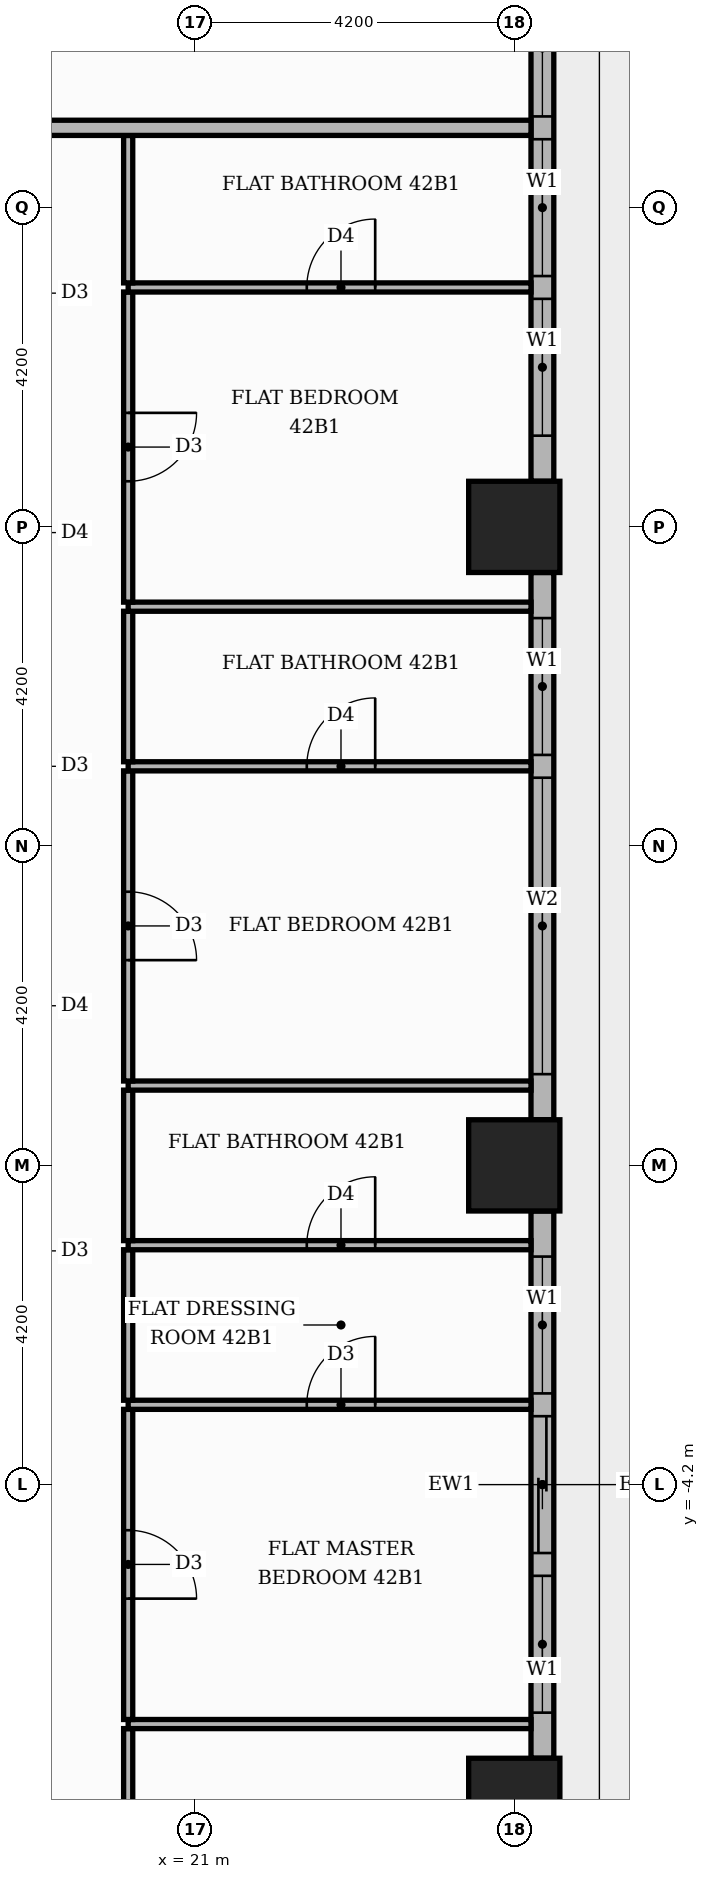
"""IFC4 building model, lengths in metres.
Left out: names, types, materials, properties, quantities, classifications, styles, units other than length and angle.
Written with IfcOpenShell. Run it as: python <this file> out.ifc"""

import sys

from ifc_helpers import new_model, si_unit, direction, frame, frame_2d, origin, origin_2d, place, context, subcontext, project, spatial, rectangle, extrude, element, fill, save


model = new_model("IFC4")
c1 = context("Model", 3, precision=1e-05, world=origin(), true_north=direction((0.0, 1.0)))
c2 = subcontext(c1, "Body", "Model", "MODEL_VIEW")
j1 = project(units=[si_unit("LENGTHUNIT", "METRE"), si_unit("PLANEANGLEUNIT", "RADIAN")], contexts=[c1])
p1 = place(None, origin())
s1 = spatial("IfcSite", under=j1, at=p1, CompositionType="ELEMENT")
p2 = place(p1, origin())
s2 = spatial("IfcBuilding", under=s1, at=p2, CompositionType="ELEMENT")
p3 = place(p2, frame((0.0, 0.0, 176.7)))
s3 = spatial("IfcBuildingStorey", under=s2, at=p3, CompositionType="ELEMENT", Elevation=176.7)
for number, where, z_axis, x_axis in (
    (1, (25.2, 0.0, 0.0), (0.0, 0.0, 1.0), (1.0, 0.0, 0.0)),
    (2, (25.2, 8.4, 0.0), (0.0, 0.0, 1.0), (1.0, 0.0, 0.0)),
    (3, (25.2, -8.4, 0.0), (0.0, 0.0, 1.0), (1.0, 0.0, 0.0)),
):
    element("IfcColumn", number, at=place(p3, frame(where, z_axis=z_axis, x_axis=x_axis)), inside=s3, PredefinedType="COLUMN", context=c2, shape_type="SweptSolid", body=[
        extrude(rectangle(XDim=1.2, YDim=1.2, at=origin_2d()), origin(), (0.0, 0.0, 1.0), 3.9),
    ])
p4 = place(p3, frame((25.57, -7.8, 0.0), z_axis=(0.0, 0.0, 1.0), x_axis=(0.0, 1.0, 0.0)))
e4 = element("IfcWall", 4, at=p4, inside=s3, PredefinedType="STANDARD", context=c2, shape_type="SweptSolid", body=[
    extrude(rectangle(XDim=7.2, YDim=0.3, at=frame_2d((3.6, 0.0))), origin(), (0.0, 0.0, 1.0), 3.4),
])
p5 = place(p4, frame((0.6, 0.0, 0.9)))
e5 = element("IfcOpeningElement", 5, at=p5, cuts=e4, PredefinedType="OPENING", context=c2, shape_type="SweptSolid", body=[
    extrude(rectangle(XDim=1.8, YDim=2.1, at=frame_2d((0.9, 1.05))), frame((0.0, 0.16, 0.0), z_axis=(0.0, -1.0, 0.0), x_axis=(1.0, 0.0, 0.0)), (0.0, 0.0, 1.0), 0.32),
])
p6 = place(p4, frame((2.7, 0.0, 0.0)))
e6 = element("IfcOpeningElement", 6, at=p6, cuts=e4, PredefinedType="OPENING", context=c2, shape_type="SweptSolid", body=[
    extrude(rectangle(XDim=1.8, YDim=2.4, at=frame_2d((0.9, 1.2))), frame((0.0, 0.16, 0.0), z_axis=(0.0, -1.0, 0.0), x_axis=(1.0, 0.0, 0.0)), (0.0, 0.0, 1.0), 0.32),
])
p7 = place(p4, frame((4.8, 0.0, 0.9)))
e7 = element("IfcOpeningElement", 7, at=p7, cuts=e4, PredefinedType="OPENING", context=c2, shape_type="SweptSolid", body=[
    extrude(rectangle(XDim=1.8, YDim=2.1, at=frame_2d((0.9, 1.05))), frame((0.0, 0.16, 0.0), z_axis=(0.0, -1.0, 0.0), x_axis=(1.0, 0.0, 0.0)), (0.0, 0.0, 1.0), 0.32),
])
p8 = place(p3, frame((25.57, 0.6, 0.0), z_axis=(0.0, 0.0, 1.0), x_axis=(0.0, 1.0, 0.0)))
e8 = element("IfcWall", 8, at=p8, inside=s3, PredefinedType="STANDARD", context=c2, shape_type="SweptSolid", body=[
    extrude(rectangle(XDim=7.2, YDim=0.3, at=frame_2d((3.6, 0.0))), origin(), (0.0, 0.0, 1.0), 3.4),
])
p9 = place(p8, frame((0.6, 0.0, 0.9)))
e9 = element("IfcOpeningElement", 9, at=p9, cuts=e8, PredefinedType="OPENING", context=c2, shape_type="SweptSolid", body=[
    extrude(rectangle(XDim=3.9, YDim=2.1, at=frame_2d((1.95, 1.05))), frame((0.0, 0.16, 0.0), z_axis=(0.0, -1.0, 0.0), x_axis=(1.0, 0.0, 0.0)), (0.0, 0.0, 1.0), 0.32),
])
p10 = place(p8, frame((4.8, 0.0, 0.9)))
e10 = element("IfcOpeningElement", 10, at=p10, cuts=e8, PredefinedType="OPENING", context=c2, shape_type="SweptSolid", body=[
    extrude(rectangle(XDim=1.8, YDim=2.1, at=frame_2d((0.9, 1.05))), frame((0.0, 0.16, 0.0), z_axis=(0.0, -1.0, 0.0), x_axis=(1.0, 0.0, 0.0)), (0.0, 0.0, 1.0), 0.32),
])
p11 = place(p3, frame((25.57, 9.0, 0.0), z_axis=(0.0, 0.0, 1.0), x_axis=(0.0, 1.0, 0.0)))
e11 = element("IfcWall", 11, at=p11, inside=s3, PredefinedType="STANDARD", context=c2, shape_type="SweptSolid", body=[
    extrude(rectangle(XDim=7.2, YDim=0.3, at=frame_2d((3.6, 0.0))), origin(), (0.0, 0.0, 1.0), 3.4),
])
p12 = place(p11, frame((0.6, 0.0, 0.9)))
e12 = element("IfcOpeningElement", 12, at=p12, cuts=e11, PredefinedType="OPENING", context=c2, shape_type="SweptSolid", body=[
    extrude(rectangle(XDim=1.8, YDim=2.1, at=frame_2d((0.9, 1.05))), frame((0.0, 0.16, 0.0), z_axis=(0.0, -1.0, 0.0), x_axis=(1.0, 0.0, 0.0)), (0.0, 0.0, 1.0), 0.32),
])
p13 = place(p11, frame((2.7, 0.0, 0.9)))
e13 = element("IfcOpeningElement", 13, at=p13, cuts=e11, PredefinedType="OPENING", context=c2, shape_type="SweptSolid", body=[
    extrude(rectangle(XDim=1.8, YDim=2.1, at=frame_2d((0.9, 1.05))), frame((0.0, 0.16, 0.0), z_axis=(0.0, -1.0, 0.0), x_axis=(1.0, 0.0, 0.0)), (0.0, 0.0, 1.0), 0.32),
])
p14 = place(p11, frame((4.8, 0.0, 0.9)))
e14 = element("IfcOpeningElement", 14, at=p14, cuts=e11, PredefinedType="OPENING", context=c2, shape_type="SweptSolid", body=[
    extrude(rectangle(XDim=1.8, YDim=2.1, at=frame_2d((0.9, 1.05))), frame((0.0, 0.16, 0.0), z_axis=(0.0, -1.0, 0.0), x_axis=(1.0, 0.0, 0.0)), (0.0, 0.0, 1.0), 0.32),
])
p15 = place(p3, frame((20.12, -11.49, 0.0), z_axis=(0.0, 0.0, 1.0), x_axis=(0.0, 1.0, 0.0)))
e15 = element("IfcWall", 15, at=p15, inside=s3, PredefinedType="PARTITIONING", context=c2, shape_type="SweptSolid", body=[
    extrude(rectangle(XDim=4.08, YDim=0.12, at=frame_2d((2.04, 0.0))), origin(), (0.0, 0.0, 1.0), 3.4),
])
p16 = place(p15, frame((1.59, 0.0, 0.0)))
e16 = element("IfcOpeningElement", 16, at=p16, cuts=e15, PredefinedType="OPENING", context=c2, shape_type="SweptSolid", body=[
    extrude(rectangle(XDim=0.9, YDim=2.1, at=frame_2d((0.45, 1.05))), frame((0.0, 0.07, 0.0), z_axis=(0.0, -1.0, 0.0), x_axis=(1.0, 0.0, 0.0)), (0.0, 0.0, 1.0), 0.14),
])
p17 = place(p3, frame((20.12, -7.35, 0.0), z_axis=(0.0, 0.0, 1.0), x_axis=(1.0, 0.0, 0.0)))
e17 = element("IfcWall", 17, at=p17, inside=s3, PredefinedType="PARTITIONING", context=c2, shape_type="SweptSolid", body=[
    extrude(rectangle(XDim=5.3, YDim=0.12, at=frame_2d((2.65, 0.0))), origin(), (0.0, 0.0, 1.0), 3.4),
])
p18 = place(p3, frame((20.12, -7.29, 0.0), z_axis=(0.0, 0.0, 1.0), x_axis=(0.0, 1.0, 0.0)))
e18 = element("IfcWall", 18, at=p18, inside=s3, PredefinedType="PARTITIONING", context=c2, shape_type="SweptSolid", body=[
    extrude(rectangle(XDim=4.08, YDim=0.12, at=frame_2d((2.04, 0.0))), origin(), (0.0, 0.0, 1.0), 3.4),
])
p19 = place(p18, frame((1.59, 0.0, 0.0)))
e19 = element("IfcOpeningElement", 19, at=p19, cuts=e18, PredefinedType="OPENING", context=c2, shape_type="SweptSolid", body=[
    extrude(rectangle(XDim=0.9, YDim=2.1, at=frame_2d((0.45, 1.05))), frame((0.0, 0.07, 0.0), z_axis=(0.0, -1.0, 0.0), x_axis=(1.0, 0.0, 0.0)), (0.0, 0.0, 1.0), 0.14),
])
p20 = place(p3, frame((20.12, -3.15, 0.0), z_axis=(0.0, 0.0, 1.0), x_axis=(1.0, 0.0, 0.0)))
e20 = element("IfcWall", 20, at=p20, inside=s3, PredefinedType="PARTITIONING", context=c2, shape_type="SweptSolid", body=[
    extrude(rectangle(XDim=5.3, YDim=0.12, at=frame_2d((2.65, 0.0))), origin(), (0.0, 0.0, 1.0), 3.4),
])
p21 = place(p20, frame((2.35, 0.0, 0.0)))
e21 = element("IfcOpeningElement", 21, at=p21, cuts=e20, PredefinedType="OPENING", context=c2, shape_type="SweptSolid", body=[
    extrude(rectangle(XDim=0.9, YDim=2.1, at=frame_2d((0.45, 1.05))), frame((0.0, 0.07, 0.0), z_axis=(0.0, -1.0, 0.0), x_axis=(1.0, 0.0, 0.0)), (0.0, 0.0, 1.0), 0.14),
])
p22 = place(p3, frame((20.12, -3.09, 0.0), z_axis=(0.0, 0.0, 1.0), x_axis=(0.0, 1.0, 0.0)))
e22 = element("IfcWall", 22, at=p22, inside=s3, PredefinedType="PARTITIONING", context=c2, shape_type="SweptSolid", body=[
    extrude(rectangle(XDim=1.98, YDim=0.12, at=frame_2d((0.99, 0.0))), origin(), (0.0, 0.0, 1.0), 3.4),
])
p23 = place(p3, frame((20.12, -1.05, 0.0), z_axis=(0.0, 0.0, 1.0), x_axis=(1.0, 0.0, 0.0)))
e23 = element("IfcWall", 23, at=p23, inside=s3, PredefinedType="PARTITIONING", context=c2, shape_type="SweptSolid", body=[
    extrude(rectangle(XDim=5.3, YDim=0.12, at=frame_2d((2.65, 0.0))), origin(), (0.0, 0.0, 1.0), 3.4),
])
p24 = place(p23, frame((2.35, 0.0, 0.0)))
e24 = element("IfcOpeningElement", 24, at=p24, cuts=e23, PredefinedType="OPENING", context=c2, shape_type="SweptSolid", body=[
    extrude(rectangle(XDim=0.9, YDim=2.1, at=frame_2d((0.45, 1.05))), frame((0.0, 0.07, 0.0), z_axis=(0.0, -1.0, 0.0), x_axis=(1.0, 0.0, 0.0)), (0.0, 0.0, 1.0), 0.14),
])
p25 = place(p3, frame((20.12, -0.99, 0.0), z_axis=(0.0, 0.0, 1.0), x_axis=(0.0, 1.0, 0.0)))
e25 = element("IfcWall", 25, at=p25, inside=s3, PredefinedType="PARTITIONING", context=c2, shape_type="SweptSolid", body=[
    extrude(rectangle(XDim=1.98, YDim=0.12, at=frame_2d((0.99, 0.0))), origin(), (0.0, 0.0, 1.0), 3.4),
])
p26 = place(p3, frame((20.12, 1.05, 0.0), z_axis=(0.0, 0.0, 1.0), x_axis=(1.0, 0.0, 0.0)))
e26 = element("IfcWall", 26, at=p26, inside=s3, PredefinedType="PARTITIONING", context=c2, shape_type="SweptSolid", body=[
    extrude(rectangle(XDim=5.3, YDim=0.12, at=frame_2d((2.65, 0.0))), origin(), (0.0, 0.0, 1.0), 3.4),
])
p27 = place(p3, frame((20.12, 1.11, 0.0), z_axis=(0.0, 0.0, 1.0), x_axis=(0.0, 1.0, 0.0)))
e27 = element("IfcWall", 27, at=p27, inside=s3, PredefinedType="PARTITIONING", context=c2, shape_type="SweptSolid", body=[
    extrude(rectangle(XDim=4.08, YDim=0.12, at=frame_2d((2.04, 0.0))), origin(), (0.0, 0.0, 1.0), 3.4),
])
p28 = place(p27, frame((1.59, 0.0, 0.0)))
e28 = element("IfcOpeningElement", 28, at=p28, cuts=e27, PredefinedType="OPENING", context=c2, shape_type="SweptSolid", body=[
    extrude(rectangle(XDim=0.9, YDim=2.1, at=frame_2d((0.45, 1.05))), frame((0.0, 0.07, 0.0), z_axis=(0.0, -1.0, 0.0), x_axis=(1.0, 0.0, 0.0)), (0.0, 0.0, 1.0), 0.14),
])
p29 = place(p3, frame((20.12, 5.25, 0.0), z_axis=(0.0, 0.0, 1.0), x_axis=(1.0, 0.0, 0.0)))
e29 = element("IfcWall", 29, at=p29, inside=s3, PredefinedType="PARTITIONING", context=c2, shape_type="SweptSolid", body=[
    extrude(rectangle(XDim=5.3, YDim=0.12, at=frame_2d((2.65, 0.0))), origin(), (0.0, 0.0, 1.0), 3.4),
])
p30 = place(p29, frame((2.35, 0.0, 0.0)))
e30 = element("IfcOpeningElement", 30, at=p30, cuts=e29, PredefinedType="OPENING", context=c2, shape_type="SweptSolid", body=[
    extrude(rectangle(XDim=0.9, YDim=2.1, at=frame_2d((0.45, 1.05))), frame((0.0, 0.07, 0.0), z_axis=(0.0, -1.0, 0.0), x_axis=(1.0, 0.0, 0.0)), (0.0, 0.0, 1.0), 0.14),
])
p31 = place(p3, frame((20.12, 5.31, 0.0), z_axis=(0.0, 0.0, 1.0), x_axis=(0.0, 1.0, 0.0)))
e31 = element("IfcWall", 31, at=p31, inside=s3, PredefinedType="PARTITIONING", context=c2, shape_type="SweptSolid", body=[
    extrude(rectangle(XDim=1.98, YDim=0.12, at=frame_2d((0.99, 0.0))), origin(), (0.0, 0.0, 1.0), 3.4),
])
p32 = place(p3, frame((20.12, 7.35, 0.0), z_axis=(0.0, 0.0, 1.0), x_axis=(1.0, 0.0, 0.0)))
e32 = element("IfcWall", 32, at=p32, inside=s3, PredefinedType="PARTITIONING", context=c2, shape_type="SweptSolid", body=[
    extrude(rectangle(XDim=5.3, YDim=0.12, at=frame_2d((2.65, 0.0))), origin(), (0.0, 0.0, 1.0), 3.4),
])
p33 = place(p3, frame((20.12, 7.41, 0.0), z_axis=(0.0, 0.0, 1.0), x_axis=(0.0, 1.0, 0.0)))
e33 = element("IfcWall", 33, at=p33, inside=s3, PredefinedType="PARTITIONING", context=c2, shape_type="SweptSolid", body=[
    extrude(rectangle(XDim=4.08, YDim=0.12, at=frame_2d((2.04, 0.0))), origin(), (0.0, 0.0, 1.0), 3.4),
])
p34 = place(p33, frame((1.59, 0.0, 0.0)))
e34 = element("IfcOpeningElement", 34, at=p34, cuts=e33, PredefinedType="OPENING", context=c2, shape_type="SweptSolid", body=[
    extrude(rectangle(XDim=0.9, YDim=2.1, at=frame_2d((0.45, 1.05))), frame((0.0, 0.07, 0.0), z_axis=(0.0, -1.0, 0.0), x_axis=(1.0, 0.0, 0.0)), (0.0, 0.0, 1.0), 0.14),
])
p35 = place(p3, frame((20.12, 11.55, 0.0), z_axis=(0.0, 0.0, 1.0), x_axis=(1.0, 0.0, 0.0)))
e35 = element("IfcWall", 35, at=p35, inside=s3, PredefinedType="PARTITIONING", context=c2, shape_type="SweptSolid", body=[
    extrude(rectangle(XDim=5.3, YDim=0.12, at=frame_2d((2.65, 0.0))), origin(), (0.0, 0.0, 1.0), 3.4),
])
p36 = place(p35, frame((2.35, 0.0, 0.0)))
e36 = element("IfcOpeningElement", 36, at=p36, cuts=e35, PredefinedType="OPENING", context=c2, shape_type="SweptSolid", body=[
    extrude(rectangle(XDim=0.9, YDim=2.1, at=frame_2d((0.45, 1.05))), frame((0.0, 0.07, 0.0), z_axis=(0.0, -1.0, 0.0), x_axis=(1.0, 0.0, 0.0)), (0.0, 0.0, 1.0), 0.14),
])
p37 = place(p3, frame((20.12, 11.61, 0.0), z_axis=(0.0, 0.0, 1.0), x_axis=(0.0, 1.0, 0.0)))
e37 = element("IfcWall", 37, at=p37, inside=s3, PredefinedType="PARTITIONING", context=c2, shape_type="SweptSolid", body=[
    extrude(rectangle(XDim=1.94, YDim=0.12, at=frame_2d((0.97, 0.0))), origin(), (0.0, 0.0, 1.0), 3.4),
])
p38 = place(p3, frame((-13.65, 13.65, 0.0), z_axis=(0.0, 0.0, 1.0), x_axis=(1.0, 0.0, 0.0)))
e38 = element("IfcWall", 38, at=p38, inside=s3, PredefinedType="PARTITIONING", context=c2, shape_type="SweptSolid", body=[
    extrude(rectangle(XDim=39.07, YDim=0.2, at=frame_2d((19.535, 0.0))), origin(), (0.0, 0.0, 1.0), 3.4),
])
p39 = place(p38, frame((23.6, 0.0, 0.0)))
e39 = element("IfcOpeningElement", 39, at=p39, cuts=e38, PredefinedType="OPENING", context=c2, shape_type="SweptSolid", body=[
    extrude(rectangle(XDim=1.1, YDim=2.4, at=frame_2d((0.55, 1.2))), frame((0.0, 0.11, 0.0), z_axis=(0.0, -1.0, 0.0), x_axis=(1.0, 0.0, 0.0)), (0.0, 0.0, 1.0), 0.22),
])
p40 = place(p5, origin())
e40 = element("IfcWindow", 40, at=p40, inside=s3, PartitioningType="SINGLE_PANEL", PredefinedType="WINDOW", context=c2, shape_type="SweptSolid", body=[
    extrude(rectangle(XDim=1.8, YDim=2.1, at=frame_2d((0.9, 1.05))), frame((0.0, 0.03, 0.0), z_axis=(0.0, -1.0, 0.0), x_axis=(1.0, 0.0, 0.0)), (0.0, 0.0, 1.0), 0.06),
])
fill(e5, e40)
p41 = place(p6, origin())
e41 = element("IfcDoor", 41, at=p41, inside=s3, OperationType="SLIDING_TO_LEFT", PredefinedType="DOOR", context=c2, shape_type="SweptSolid", body=[
    extrude(rectangle(XDim=1.8, YDim=2.4, at=frame_2d((0.9, 1.2))), frame((0.0, 0.025, 0.0), z_axis=(0.0, -1.0, 0.0), x_axis=(1.0, 0.0, 0.0)), (0.0, 0.0, 1.0), 0.05),
])
fill(e6, e41)
p42 = place(p7, origin())
e42 = element("IfcWindow", 42, at=p42, inside=s3, PartitioningType="SINGLE_PANEL", PredefinedType="WINDOW", context=c2, shape_type="SweptSolid", body=[
    extrude(rectangle(XDim=1.8, YDim=2.1, at=frame_2d((0.9, 1.05))), frame((0.0, 0.03, 0.0), z_axis=(0.0, -1.0, 0.0), x_axis=(1.0, 0.0, 0.0)), (0.0, 0.0, 1.0), 0.06),
])
fill(e7, e42)
p43 = place(p9, origin())
e43 = element("IfcWindow", 43, at=p43, inside=s3, PartitioningType="SINGLE_PANEL", PredefinedType="WINDOW", context=c2, shape_type="SweptSolid", body=[
    extrude(rectangle(XDim=3.9, YDim=2.1, at=frame_2d((1.95, 1.05))), frame((0.0, 0.03, 0.0), z_axis=(0.0, -1.0, 0.0), x_axis=(1.0, 0.0, 0.0)), (0.0, 0.0, 1.0), 0.06),
])
fill(e9, e43)
p44 = place(p10, origin())
e44 = element("IfcWindow", 44, at=p44, inside=s3, PartitioningType="SINGLE_PANEL", PredefinedType="WINDOW", context=c2, shape_type="SweptSolid", body=[
    extrude(rectangle(XDim=1.8, YDim=2.1, at=frame_2d((0.9, 1.05))), frame((0.0, 0.03, 0.0), z_axis=(0.0, -1.0, 0.0), x_axis=(1.0, 0.0, 0.0)), (0.0, 0.0, 1.0), 0.06),
])
fill(e10, e44)
p45 = place(p12, origin())
e45 = element("IfcWindow", 45, at=p45, inside=s3, PartitioningType="SINGLE_PANEL", PredefinedType="WINDOW", context=c2, shape_type="SweptSolid", body=[
    extrude(rectangle(XDim=1.8, YDim=2.1, at=frame_2d((0.9, 1.05))), frame((0.0, 0.03, 0.0), z_axis=(0.0, -1.0, 0.0), x_axis=(1.0, 0.0, 0.0)), (0.0, 0.0, 1.0), 0.06),
])
fill(e12, e45)
p46 = place(p13, origin())
e46 = element("IfcWindow", 46, at=p46, inside=s3, PartitioningType="SINGLE_PANEL", PredefinedType="WINDOW", context=c2, shape_type="SweptSolid", body=[
    extrude(rectangle(XDim=1.8, YDim=2.1, at=frame_2d((0.9, 1.05))), frame((0.0, 0.03, 0.0), z_axis=(0.0, -1.0, 0.0), x_axis=(1.0, 0.0, 0.0)), (0.0, 0.0, 1.0), 0.06),
])
fill(e13, e46)
p47 = place(p14, origin())
e47 = element("IfcWindow", 47, at=p47, inside=s3, PartitioningType="SINGLE_PANEL", PredefinedType="WINDOW", context=c2, shape_type="SweptSolid", body=[
    extrude(rectangle(XDim=1.8, YDim=2.1, at=frame_2d((0.9, 1.05))), frame((0.0, 0.03, 0.0), z_axis=(0.0, -1.0, 0.0), x_axis=(1.0, 0.0, 0.0)), (0.0, 0.0, 1.0), 0.06),
])
fill(e14, e47)
p48 = place(p19, frame((0.9, 0.0, 0.0), z_axis=(0.0, 0.0, 1.0), x_axis=(-1.0, 0.0, 0.0)))
e48 = element("IfcDoor", 48, at=p48, inside=s3, OperationType="SINGLE_SWING_LEFT", PredefinedType="DOOR", context=c2, shape_type="SweptSolid", body=[
    extrude(rectangle(XDim=0.9, YDim=2.1, at=frame_2d((0.45, 1.05))), frame((0.0, 0.025, 0.0), z_axis=(0.0, -1.0, 0.0), x_axis=(1.0, 0.0, 0.0)), (0.0, 0.0, 1.0), 0.05),
])
fill(e19, e48)
p49 = place(p21, origin())
e49 = element("IfcDoor", 49, at=p49, inside=s3, OperationType="SINGLE_SWING_RIGHT", PredefinedType="DOOR", context=c2, shape_type="SweptSolid", body=[
    extrude(rectangle(XDim=0.9, YDim=2.1, at=frame_2d((0.45, 1.05))), frame((0.0, 0.025, 0.0), z_axis=(0.0, -1.0, 0.0), x_axis=(1.0, 0.0, 0.0)), (0.0, 0.0, 1.0), 0.05),
])
fill(e21, e49)
p50 = place(p24, origin())
e50 = element("IfcDoor", 50, at=p50, inside=s3, OperationType="SINGLE_SWING_RIGHT", PredefinedType="DOOR", context=c2, shape_type="SweptSolid", body=[
    extrude(rectangle(XDim=0.9, YDim=2.1, at=frame_2d((0.45, 1.05))), frame((0.0, 0.025, 0.0), z_axis=(0.0, -1.0, 0.0), x_axis=(1.0, 0.0, 0.0)), (0.0, 0.0, 1.0), 0.05),
])
fill(e24, e50)
p51 = place(p28, frame((0.9, 0.0, 0.0), z_axis=(0.0, 0.0, 1.0), x_axis=(-1.0, 0.0, 0.0)))
e51 = element("IfcDoor", 51, at=p51, inside=s3, OperationType="SINGLE_SWING_LEFT", PredefinedType="DOOR", context=c2, shape_type="SweptSolid", body=[
    extrude(rectangle(XDim=0.9, YDim=2.1, at=frame_2d((0.45, 1.05))), frame((0.0, 0.025, 0.0), z_axis=(0.0, -1.0, 0.0), x_axis=(1.0, 0.0, 0.0)), (0.0, 0.0, 1.0), 0.05),
])
fill(e28, e51)
p52 = place(p30, origin())
e52 = element("IfcDoor", 52, at=p52, inside=s3, OperationType="SINGLE_SWING_RIGHT", PredefinedType="DOOR", context=c2, shape_type="SweptSolid", body=[
    extrude(rectangle(XDim=0.9, YDim=2.1, at=frame_2d((0.45, 1.05))), frame((0.0, 0.025, 0.0), z_axis=(0.0, -1.0, 0.0), x_axis=(1.0, 0.0, 0.0)), (0.0, 0.0, 1.0), 0.05),
])
fill(e30, e52)
p53 = place(p34, frame((0.9, 0.0, 0.0), z_axis=(0.0, 0.0, 1.0), x_axis=(-1.0, 0.0, 0.0)))
e53 = element("IfcDoor", 53, at=p53, inside=s3, OperationType="SINGLE_SWING_RIGHT", PredefinedType="DOOR", context=c2, shape_type="SweptSolid", body=[
    extrude(rectangle(XDim=0.9, YDim=2.1, at=frame_2d((0.45, 1.05))), frame((0.0, 0.025, 0.0), z_axis=(0.0, -1.0, 0.0), x_axis=(1.0, 0.0, 0.0)), (0.0, 0.0, 1.0), 0.05),
])
fill(e34, e53)
p54 = place(p36, origin())
e54 = element("IfcDoor", 54, at=p54, inside=s3, OperationType="SINGLE_SWING_RIGHT", PredefinedType="DOOR", context=c2, shape_type="SweptSolid", body=[
    extrude(rectangle(XDim=0.9, YDim=2.1, at=frame_2d((0.45, 1.05))), frame((0.0, 0.025, 0.0), z_axis=(0.0, -1.0, 0.0), x_axis=(1.0, 0.0, 0.0)), (0.0, 0.0, 1.0), 0.05),
])
fill(e36, e54)
save(model, sys.argv[1])
